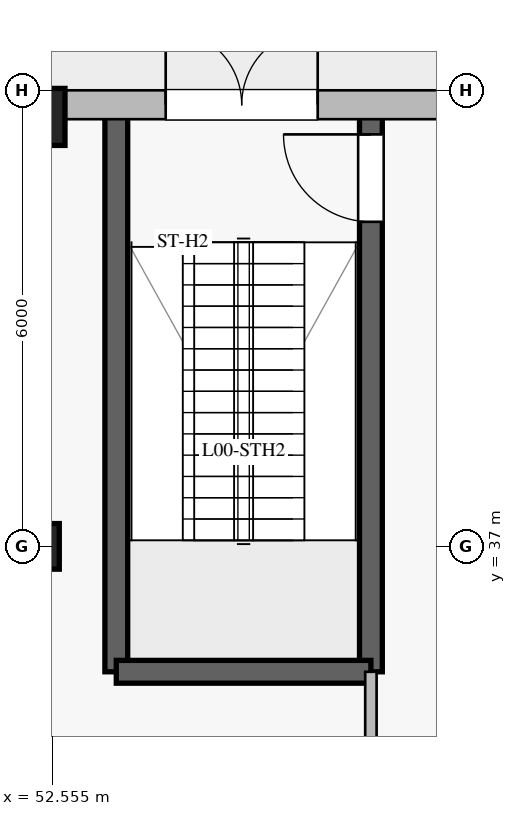
"""IFC4 building model, lengths in metres.
Left out: names, types, materials, properties, quantities, classifications, styles, units other than length and angle.
Written with IfcOpenShell. Run it as: python <this file> out.ifc"""

import sys

from ifc_helpers import new_model, si_unit, direction, frame, frame_2d, origin, origin_2d, place, context, subcontext, project, spatial, rectangle, extrude, element, fill, save


model = new_model("IFC4")
c1 = context("Model", 3, precision=1e-05, world=origin(), true_north=direction((0.0, 1.0)))
c2 = subcontext(c1, "Body", "Model", "MODEL_VIEW")
j1 = project(units=[si_unit("LENGTHUNIT", "METRE"), si_unit("PLANEANGLEUNIT", "RADIAN")], contexts=[c1])
p1 = place(None, origin())
s1 = spatial("IfcSite", under=j1, at=p1, CompositionType="ELEMENT")
p2 = place(p1, origin())
s2 = spatial("IfcBuilding", under=s1, at=p2, CompositionType="ELEMENT")
p3 = place(p2, origin())
s3 = spatial("IfcBuildingStorey", under=s2, at=p3, CompositionType="ELEMENT", Elevation=0.0)
p4 = place(p3, frame((56.75, 35.35, 0.0), z_axis=(0.0, 0.0, 1.0), x_axis=(0.0, 1.0, 0.0)))
e1 = element("IfcWall", 1, at=p4, inside=s3, PredefinedType="SOLIDWALL", context=c2, shape_type="SweptSolid", body=[
    extrude(rectangle(XDim=7.3, YDim=0.3, at=frame_2d((3.65, 0.0))), origin(), (0.0, 0.0, 1.0), 4.94),
])
p5 = place(p4, frame((5.92, 0.0, 0.0)))
e2 = element("IfcOpeningElement", 2, at=p5, cuts=e1, PredefinedType="OPENING", context=c2, shape_type="SweptSolid", body=[
    extrude(rectangle(XDim=1.15, YDim=2.2, at=frame_2d((0.575, 1.1))), frame((0.0, 0.16, 0.0), z_axis=(0.0, -1.0, 0.0), x_axis=(1.0, 0.0, 0.0)), (0.0, 0.0, 1.0), 0.32),
])
p6 = place(p3, frame((53.4, 35.35, 0.0), z_axis=(0.0, 0.0, 1.0), x_axis=(0.0, 1.0, 0.0)))
e3 = element("IfcWall", 3, at=p6, inside=s3, PredefinedType="SOLIDWALL", context=c2, shape_type="SweptSolid", body=[
    extrude(rectangle(XDim=7.3, YDim=0.3, at=frame_2d((3.65, 0.0))), origin(), (0.0, 0.0, 1.0), 4.94),
])
p7 = place(p3, frame((53.4, 35.35, 0.0), z_axis=(0.0, 0.0, 1.0), x_axis=(1.0, 0.0, 0.0)))
e4 = element("IfcWall", 4, at=p7, inside=s3, PredefinedType="SOLIDWALL", context=c2, shape_type="SweptSolid", body=[
    extrude(rectangle(XDim=3.35, YDim=0.3, at=frame_2d((1.675, 0.0))), origin(), (0.0, 0.0, 1.0), 4.94),
])
p8 = place(p3, frame((52.35, 37.0, 0.0), z_axis=(0.0, 0.0, 1.0), x_axis=(1.0, 0.0, 0.0)))
e5 = element("IfcColumn", 5, at=p8, inside=s3, PredefinedType="COLUMN", context=c2, shape_type="SweptSolid", body=[
    extrude(rectangle(XDim=0.6, YDim=0.6, at=origin_2d()), origin(), (0.0, 0.0, 1.0), 5.2),
])
p9 = place(p3, frame((52.35, 42.65, 0.0), z_axis=(0.0, 0.0, 1.0), x_axis=(1.0, 0.0, 0.0)))
e6 = element("IfcColumn", 6, at=p9, inside=s3, PredefinedType="COLUMN", context=c2, shape_type="SweptSolid", body=[
    extrude(rectangle(XDim=0.75, YDim=0.75, at=origin_2d()), origin(), (0.0, 0.0, 1.0), 5.2),
])
p10 = place(p3, frame((52.0, 42.81, 0.0), z_axis=(0.0, 0.0, 1.0), x_axis=(1.0, 0.0, 0.0)))
e7 = element("IfcWall", 7, at=p10, inside=s3, PredefinedType="STANDARD", context=c2, shape_type="SweptSolid", body=[
    extrude(rectangle(XDim=23.0, YDim=0.38, at=frame_2d((11.5, 0.0))), origin(), (0.0, 0.0, 1.0), 4.94),
])
p11 = place(p10, frame((2.05, 0.0, 0.0)))
e8 = element("IfcOpeningElement", 8, at=p11, cuts=e7, PredefinedType="OPENING", context=c2, shape_type="SweptSolid", body=[
    extrude(rectangle(XDim=2.0, YDim=2.4, at=frame_2d((1.0, 1.2))), frame((0.0, 0.2, 0.0), z_axis=(0.0, -1.0, 0.0), x_axis=(1.0, 0.0, 0.0)), (0.0, 0.0, 1.0), 0.4),
])
p12 = place(p10, frame((16.05, 0.0, 0.0)))
e9 = element("IfcOpeningElement", 9, at=p12, cuts=e7, PredefinedType="OPENING", context=c2, shape_type="SweptSolid", body=[
    extrude(rectangle(XDim=6.0, YDim=2.6, at=frame_2d((3.0, 1.3))), frame((0.0, 0.2, 0.0), z_axis=(0.0, -1.0, 0.0), x_axis=(1.0, 0.0, 0.0)), (0.0, 0.0, 1.0), 0.4),
])
p13 = place(p3, frame((56.75, 14.65, 0.0), z_axis=(0.0, 0.0, 1.0), x_axis=(0.0, 1.0, 0.0)))
e10 = element("IfcWall", 10, at=p13, inside=s3, PredefinedType="PARTITIONING", context=c2, shape_type="SweptSolid", body=[
    extrude(rectangle(XDim=20.7, YDim=0.15, at=frame_2d((10.35, 0.0))), origin(), (0.0, 0.0, 1.0), 4.94),
])
p14 = place(p13, frame((9.675, 0.0, 0.0)))
e11 = element("IfcOpeningElement", 11, at=p14, cuts=e10, PredefinedType="OPENING", context=c2, shape_type="SweptSolid", body=[
    extrude(rectangle(XDim=1.35, YDim=2.2, at=frame_2d((0.675, 1.1))), frame((0.0, 0.085, 0.0), z_axis=(0.0, -1.0, 0.0), x_axis=(1.0, 0.0, 0.0)), (0.0, 0.0, 1.0), 0.17),
])
p15 = place(p11, origin())
e12 = element("IfcDoor", 12, at=p15, inside=s3, OperationType="DOUBLE_DOOR_SINGLE_SWING", PredefinedType="DOOR", context=c2, shape_type="SweptSolid", body=[
    extrude(rectangle(XDim=2.0, YDim=2.4, at=frame_2d((1.0, 1.2))), frame((0.0, 0.025, 0.0), z_axis=(0.0, -1.0, 0.0), x_axis=(1.0, 0.0, 0.0)), (0.0, 0.0, 1.0), 0.05),
])
fill(e8, e12)
p16 = place(p5, origin())
e13 = element("IfcDoor", 13, at=p16, inside=s3, OperationType="SINGLE_SWING_RIGHT", PredefinedType="DOOR", context=c2, shape_type="SweptSolid", body=[
    extrude(rectangle(XDim=1.15, YDim=2.2, at=frame_2d((0.575, 1.1))), frame((0.0, 0.025, 0.0), z_axis=(0.0, -1.0, 0.0), x_axis=(1.0, 0.0, 0.0)), (0.0, 0.0, 1.0), 0.05),
])
fill(e2, e13)
save(model, sys.argv[1])
